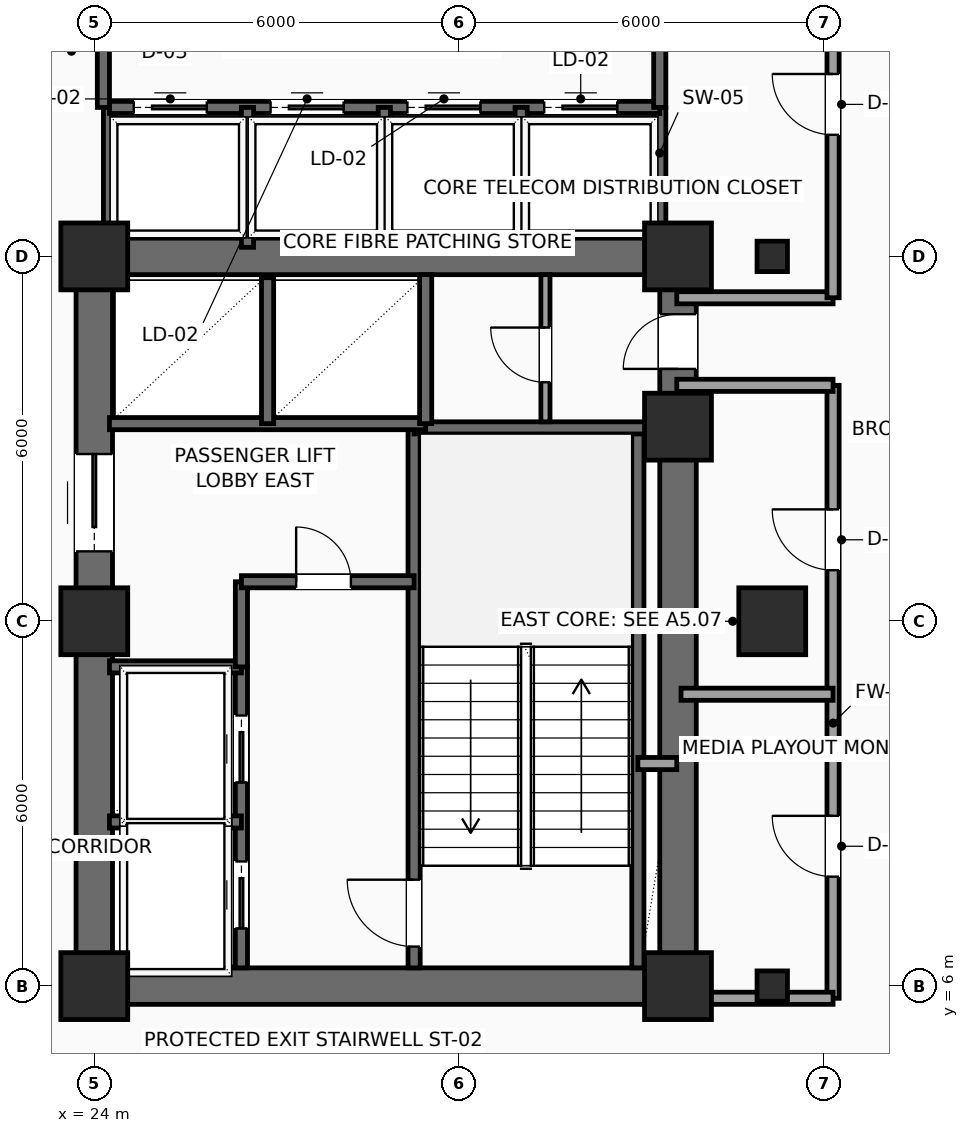
"""IFC4 building model, lengths in metres.
Left out: names, types, materials, properties, quantities, classifications, styles, units other than length and angle.
Written with IfcOpenShell. Run it as: python <this file> out.ifc"""

import sys

from ifc_helpers import new_model, si_unit, direction, frame, frame_2d, origin, origin_2d, place, context, subcontext, project, spatial, rectangle, hollow_rectangle, extrude, element, fill, save


model = new_model("IFC4")
c1 = context("Model", 3, precision=1e-05, world=origin(), true_north=direction((0.0, 1.0)))
c2 = subcontext(c1, "Body", "Model", "MODEL_VIEW")
j1 = project(units=[si_unit("LENGTHUNIT", "METRE"), si_unit("PLANEANGLEUNIT", "RADIAN")], contexts=[c1])
p1 = place(None, origin())
s1 = spatial("IfcSite", under=j1, at=p1, CompositionType="ELEMENT")
p2 = place(p1, origin())
s2 = spatial("IfcBuilding", under=s1, at=p2, CompositionType="ELEMENT")
p3 = place(p2, frame((0.0, 0.0, 123.15)))
s3 = spatial("IfcBuildingStorey", under=s2, at=p3, CompositionType="ELEMENT", Elevation=123.15)
for number, where, z_axis, x_axis in (
    (1, (24.0, 6.0, 0.0), (0.0, 0.0, 1.0), (1.0, 0.0, 0.0)),
    (2, (24.0, 12.0, 0.0), (0.0, 0.0, 1.0), (1.0, 0.0, 0.0)),
    (3, (24.0, 18.0, 0.0), (0.0, 0.0, 1.0), (1.0, 0.0, 0.0)),
    (4, (33.6, 6.0, 0.0), (0.0, 0.0, 1.0), (1.0, 0.0, 0.0)),
    (5, (33.6, 15.2, 0.0), (0.0, 0.0, 1.0), (1.0, 0.0, 0.0)),
    (6, (33.6, 18.0, 0.0), (0.0, 0.0, 1.0), (1.0, 0.0, 0.0)),
):
    element("IfcColumn", number, at=place(p3, frame(where, z_axis=z_axis, x_axis=x_axis)), inside=s3, PredefinedType="COLUMN", context=c2, shape_type="SweptSolid", body=[
        extrude(rectangle(XDim=1.1, YDim=1.1, at=origin_2d()), origin(), (0.0, 0.0, 1.0), 3.75),
    ])
p4 = place(p3, frame((35.15, 6.0, 0.0), z_axis=(0.0, 0.0, 1.0), x_axis=(1.0, 0.0, 0.0)))
e7 = element("IfcColumn", 7, at=p4, inside=s3, PredefinedType="COLUMN", context=c2, shape_type="SweptSolid", body=[
    extrude(hollow_rectangle(XDim=0.5, YDim=0.5, WallThickness=0.025, InnerFilletRadius=0.025, OuterFilletRadius=0.04, at=origin_2d()), origin(), (0.0, 0.0, 1.0), 3.75),
])
p5 = place(p3, frame((35.15, 12.0, 0.0), z_axis=(0.0, 0.0, 1.0), x_axis=(1.0, 0.0, 0.0)))
e8 = element("IfcColumn", 8, at=p5, inside=s3, PredefinedType="COLUMN", context=c2, shape_type="SweptSolid", body=[
    extrude(rectangle(XDim=1.1, YDim=1.1, at=origin_2d()), origin(), (0.0, 0.0, 1.0), 3.75),
])
p6 = place(p3, frame((35.15, 18.0, 0.0), z_axis=(0.0, 0.0, 1.0), x_axis=(1.0, 0.0, 0.0)))
e9 = element("IfcColumn", 9, at=p6, inside=s3, PredefinedType="COLUMN", context=c2, shape_type="SweptSolid", body=[
    extrude(hollow_rectangle(XDim=0.5, YDim=0.5, WallThickness=0.025, InnerFilletRadius=0.025, OuterFilletRadius=0.04, at=origin_2d()), origin(), (0.0, 0.0, 1.0), 3.75),
])
for number, where, z_axis, x_axis in (
    (10, (24.0, 6.0, 0.0), (0.0, 0.0, 1.0), (1.0, 0.0, 0.0)),
    (11, (24.0, 18.0, 0.0), (0.0, 0.0, 1.0), (1.0, 0.0, 0.0)),
):
    element("IfcWall", number, at=place(p3, frame(where, z_axis=z_axis, x_axis=x_axis)), inside=s3, PredefinedType="SHEAR", context=c2, shape_type="SweptSolid", body=[
        extrude(rectangle(XDim=9.6, YDim=0.6, at=frame_2d((4.8, 0.0))), origin(), (0.0, 0.0, 1.0), 3.525),
    ])
p7 = place(p3, frame((24.0, 6.0, 0.0), z_axis=(0.0, 0.0, 1.0), x_axis=(0.0, 1.0, 0.0)))
e12 = element("IfcWall", 12, at=p7, inside=s3, PredefinedType="SHEAR", context=c2, shape_type="SweptSolid", body=[
    extrude(rectangle(XDim=12.0, YDim=0.6, at=frame_2d((6.0, 0.0))), origin(), (0.0, 0.0, 1.0), 3.525),
])
p8 = place(p7, frame((7.15, 0.0, 0.0)))
e13 = element("IfcOpeningElement", 13, at=p8, cuts=e12, PredefinedType="OPENING", context=c2, shape_type="SweptSolid", body=[
    extrude(rectangle(XDim=1.6, YDim=2.3, at=frame_2d((0.8, 1.15))), frame((0.0, 0.31, 0.0), z_axis=(0.0, -1.0, 0.0), x_axis=(1.0, 0.0, 0.0)), (0.0, 0.0, 1.0), 0.62),
])
p9 = place(p3, frame((33.6, 6.0, 0.0), z_axis=(0.0, 0.0, 1.0), x_axis=(0.0, 1.0, 0.0)))
e14 = element("IfcWall", 14, at=p9, inside=s3, PredefinedType="SHEAR", context=c2, shape_type="SweptSolid", body=[
    extrude(rectangle(XDim=12.0, YDim=0.6, at=frame_2d((6.0, 0.0))), origin(), (0.0, 0.0, 1.0), 3.525),
])
p10 = place(p9, frame((10.15, 0.0, 0.0)))
e15 = element("IfcOpeningElement", 15, at=p10, cuts=e14, PredefinedType="OPENING", context=c2, shape_type="SweptSolid", body=[
    extrude(rectangle(XDim=0.9, YDim=2.15, at=frame_2d((0.45, 1.075))), frame((0.0, 0.31, 0.0), z_axis=(0.0, -1.0, 0.0), x_axis=(1.0, 0.0, 0.0)), (0.0, 0.0, 1.0), 0.62),
])
p11 = place(p3, frame((29.26, 6.3, 0.0), z_axis=(0.0, 0.0, 1.0), x_axis=(0.0, 1.0, 0.0)))
e16 = element("IfcWall", 16, at=p11, inside=s3, PredefinedType="SHEAR", context=c2, shape_type="SweptSolid", body=[
    extrude(rectangle(XDim=8.88, YDim=0.2, at=frame_2d((4.44, 0.0))), origin(), (0.0, 0.0, 1.0), 3.525),
])
p12 = place(p11, frame((0.35, 0.0, 0.0)))
e17 = element("IfcOpeningElement", 17, at=p12, cuts=e16, PredefinedType="OPENING", context=c2, shape_type="SweptSolid", body=[
    extrude(rectangle(XDim=1.1, YDim=2.2, at=frame_2d((0.55, 1.1))), frame((0.0, 0.11, 0.0), z_axis=(0.0, -1.0, 0.0), x_axis=(1.0, 0.0, 0.0)), (0.0, 0.0, 1.0), 0.22),
])
p13 = place(p3, frame((32.94, 6.3, 0.0), z_axis=(0.0, 0.0, 1.0), x_axis=(0.0, 1.0, 0.0)))
e18 = element("IfcWall", 18, at=p13, inside=s3, PredefinedType="SHEAR", context=c2, shape_type="SweptSolid", body=[
    extrude(rectangle(XDim=8.88, YDim=0.2, at=frame_2d((4.44, 0.0))), origin(), (0.0, 0.0, 1.0), 3.525),
])
p14 = place(p3, frame((29.26, 15.18, 0.0), z_axis=(0.0, 0.0, 1.0), x_axis=(1.0, 0.0, 0.0)))
e19 = element("IfcWall", 19, at=p14, inside=s3, PredefinedType="SHEAR", context=c2, shape_type="SweptSolid", body=[
    extrude(rectangle(XDim=4.04, YDim=0.2, at=frame_2d((2.02, 0.0))), origin(), (0.0, 0.0, 1.0), 3.525),
])
p15 = place(p3, frame((26.42, 6.3, 0.0), z_axis=(0.0, 0.0, 1.0), x_axis=(0.0, 1.0, 0.0)))
e20 = element("IfcWall", 20, at=p15, inside=s3, PredefinedType="SHEAR", context=c2, shape_type="SweptSolid", body=[
    extrude(rectangle(XDim=4.95, YDim=0.2, at=frame_2d((2.475, 0.0))), origin(), (0.0, 0.0, 1.0), 3.525),
])
p16 = place(p15, frame((0.65, 0.0, 0.0)))
e21 = element("IfcOpeningElement", 21, at=p16, cuts=e20, PredefinedType="OPENING", context=c2, shape_type="SweptSolid", body=[
    extrude(rectangle(XDim=1.1, YDim=2.2, at=frame_2d((0.55, 1.1))), frame((0.0, 0.11, 0.0), z_axis=(0.0, -1.0, 0.0), x_axis=(1.0, 0.0, 0.0)), (0.0, 0.0, 1.0), 0.22),
])
p17 = place(p15, frame((3.05, 0.0, 0.0)))
e22 = element("IfcOpeningElement", 22, at=p17, cuts=e20, PredefinedType="OPENING", context=c2, shape_type="SweptSolid", body=[
    extrude(rectangle(XDim=1.1, YDim=2.2, at=frame_2d((0.55, 1.1))), frame((0.0, 0.11, 0.0), z_axis=(0.0, -1.0, 0.0), x_axis=(1.0, 0.0, 0.0)), (0.0, 0.0, 1.0), 0.22),
])
for number, where, z_axis, x_axis in (
    (23, (24.25, 8.7, 0.0), (0.0, 0.0, 1.0), (1.0, 0.0, 0.0)),
    (24, (24.25, 11.25, 0.0), (0.0, 0.0, 1.0), (1.0, 0.0, 0.0)),
):
    element("IfcWall", number, at=place(p3, frame(where, z_axis=z_axis, x_axis=x_axis)), inside=s3, PredefinedType="SHEAR", context=c2, shape_type="SweptSolid", body=[
        extrude(rectangle(XDim=2.17, YDim=0.2, at=frame_2d((1.085, 0.0))), origin(), (0.0, 0.0, 1.0), 3.525),
    ])
p18 = place(p3, frame((26.42, 11.25, 0.0), z_axis=(0.0, 0.0, 1.0), x_axis=(0.0, 1.0, 0.0)))
e25 = element("IfcWall", 25, at=p18, inside=s3, PredefinedType="SHEAR", context=c2, shape_type="SweptSolid", body=[
    extrude(rectangle(XDim=1.4, YDim=0.2, at=frame_2d((0.7, 0.0))), origin(), (0.0, 0.0, 1.0), 3.525),
])
p19 = place(p3, frame((26.42, 12.65, 0.0), z_axis=(0.0, 0.0, 1.0), x_axis=(1.0, 0.0, 0.0)))
e26 = element("IfcWall", 26, at=p19, inside=s3, PredefinedType="SHEAR", context=c2, shape_type="SweptSolid", body=[
    extrude(rectangle(XDim=2.84, YDim=0.2, at=frame_2d((1.42, 0.0))), origin(), (0.0, 0.0, 1.0), 3.525),
])
p20 = place(p19, frame((0.9, 0.0, 0.0)))
e27 = element("IfcOpeningElement", 27, at=p20, cuts=e26, PredefinedType="OPENING", context=c2, shape_type="SweptSolid", body=[
    extrude(rectangle(XDim=0.9, YDim=2.15, at=frame_2d((0.45, 1.075))), frame((0.0, 0.11, 0.0), z_axis=(0.0, -1.0, 0.0), x_axis=(1.0, 0.0, 0.0)), (0.0, 0.0, 1.0), 0.22),
])
p21 = place(p3, frame((32.94, 9.66, 0.0), z_axis=(0.0, 0.0, 1.0), x_axis=(1.0, 0.0, 0.0)))
e28 = element("IfcWall", 28, at=p21, inside=s3, PredefinedType="SOLIDWALL", context=c2, shape_type="SweptSolid", body=[
    extrude(rectangle(XDim=0.64, YDim=0.2, at=frame_2d((0.32, 0.0))), origin(), (0.0, 0.0, 1.0), 3.525),
])
p22 = place(p3, frame((24.25, 15.25, 0.0), z_axis=(0.0, 0.0, 1.0), x_axis=(1.0, 0.0, 0.0)))
e29 = element("IfcWall", 29, at=p22, inside=s3, PredefinedType="SHEAR", context=c2, shape_type="SweptSolid", body=[
    extrude(rectangle(XDim=5.2, YDim=0.2, at=frame_2d((2.6, 0.0))), origin(), (0.0, 0.0, 1.0), 3.525),
])
p23 = place(p3, frame((26.85, 15.25, 0.0), z_axis=(0.0, 0.0, 1.0), x_axis=(0.0, 1.0, 0.0)))
e30 = element("IfcWall", 30, at=p23, inside=s3, PredefinedType="SHEAR", context=c2, shape_type="SweptSolid", body=[
    extrude(rectangle(XDim=2.4, YDim=0.2, at=frame_2d((1.2, 0.0))), origin(), (0.0, 0.0, 1.0), 3.525),
])
p24 = place(p3, frame((29.45, 15.25, 0.0), z_axis=(0.0, 0.0, 1.0), x_axis=(0.0, 1.0, 0.0)))
e31 = element("IfcWall", 31, at=p24, inside=s3, PredefinedType="SHEAR", context=c2, shape_type="SweptSolid", body=[
    extrude(rectangle(XDim=2.45, YDim=0.2, at=frame_2d((1.225, 0.0))), origin(), (0.0, 0.0, 1.0), 3.525),
])
p25 = place(p3, frame((31.42, 15.28, 0.0), z_axis=(0.0, 0.0, 1.0), x_axis=(0.0, 1.0, 0.0)))
e32 = element("IfcWall", 32, at=p25, inside=s3, PredefinedType="PARTITIONING", context=c2, shape_type="SweptSolid", body=[
    extrude(rectangle(XDim=2.42, YDim=0.15, at=frame_2d((1.21, 0.0))), origin(), (0.0, 0.0, 1.0), 3.525),
])
p26 = place(p25, frame((0.65, 0.0, 0.0)))
e33 = element("IfcOpeningElement", 33, at=p26, cuts=e32, PredefinedType="OPENING", context=c2, shape_type="SweptSolid", body=[
    extrude(rectangle(XDim=0.9, YDim=2.15, at=frame_2d((0.45, 1.075))), frame((0.0, 0.085, 0.0), z_axis=(0.0, -1.0, 0.0), x_axis=(1.0, 0.0, 0.0)), (0.0, 0.0, 1.0), 0.17),
])
for number, where, z_axis, x_axis in (
    (34, (33.3, 18.1, 0.0), (0.0, 0.0, 1.0), (0.0, 1.0, 0.0)),
    (35, (24.25, 18.1, 0.0), (0.0, 0.0, 1.0), (0.0, 1.0, 0.0)),
):
    element("IfcWall", number, at=place(p3, frame(where, z_axis=z_axis, x_axis=x_axis)), inside=s3, PredefinedType="SHEAR", context=c2, shape_type="SweptSolid", body=[
        extrude(rectangle(XDim=2.35, YDim=0.2, at=frame_2d((1.175, 0.0))), origin(), (0.0, 0.0, 1.0), 3.525),
    ])
p27 = place(p3, frame((24.25, 20.45, 0.0), z_axis=(0.0, 0.0, 1.0), x_axis=(1.0, 0.0, 0.0)))
e36 = element("IfcWall", 36, at=p27, inside=s3, PredefinedType="SHEAR", context=c2, shape_type="SweptSolid", body=[
    extrude(rectangle(XDim=9.05, YDim=0.2, at=frame_2d((4.525, 0.0))), origin(), (0.0, 0.0, 1.0), 3.525),
])
p28 = place(p27, frame((0.4, 0.0, 0.0)))
e37 = element("IfcOpeningElement", 37, at=p28, cuts=e36, PredefinedType="OPENING", context=c2, shape_type="SweptSolid", body=[
    extrude(rectangle(XDim=1.2, YDim=2.2, at=frame_2d((0.6, 1.1))), frame((0.0, 0.11, 0.0), z_axis=(0.0, -1.0, 0.0), x_axis=(1.0, 0.0, 0.0)), (0.0, 0.0, 1.0), 0.22),
])
p29 = place(p27, frame((2.65, 0.0, 0.0)))
e38 = element("IfcOpeningElement", 38, at=p29, cuts=e36, PredefinedType="OPENING", context=c2, shape_type="SweptSolid", body=[
    extrude(rectangle(XDim=1.2, YDim=2.2, at=frame_2d((0.6, 1.1))), frame((0.0, 0.11, 0.0), z_axis=(0.0, -1.0, 0.0), x_axis=(1.0, 0.0, 0.0)), (0.0, 0.0, 1.0), 0.22),
])
p30 = place(p27, frame((4.9, 0.0, 0.0)))
e39 = element("IfcOpeningElement", 39, at=p30, cuts=e36, PredefinedType="OPENING", context=c2, shape_type="SweptSolid", body=[
    extrude(rectangle(XDim=1.2, YDim=2.2, at=frame_2d((0.6, 1.1))), frame((0.0, 0.11, 0.0), z_axis=(0.0, -1.0, 0.0), x_axis=(1.0, 0.0, 0.0)), (0.0, 0.0, 1.0), 0.22),
])
p31 = place(p27, frame((7.15, 0.0, 0.0)))
e40 = element("IfcOpeningElement", 40, at=p31, cuts=e36, PredefinedType="OPENING", context=c2, shape_type="SweptSolid", body=[
    extrude(rectangle(XDim=1.2, YDim=2.2, at=frame_2d((0.6, 1.1))), frame((0.0, 0.11, 0.0), z_axis=(0.0, -1.0, 0.0), x_axis=(1.0, 0.0, 0.0)), (0.0, 0.0, 1.0), 0.22),
])
for number, where, z_axis, x_axis in (
    (41, (26.52, 18.15, 0.0), (0.0, 0.0, 1.0), (0.0, 1.0, 0.0)),
    (42, (28.77, 18.15, 0.0), (0.0, 0.0, 1.0), (0.0, 1.0, 0.0)),
    (43, (31.02, 18.15, 0.0), (0.0, 0.0, 1.0), (0.0, 1.0, 0.0)),
):
    element("IfcWall", number, at=place(p3, frame(where, z_axis=z_axis, x_axis=x_axis)), inside=s3, PredefinedType="SHEAR", context=c2, shape_type="SweptSolid", body=[
        extrude(rectangle(XDim=2.3, YDim=0.2, at=frame_2d((1.15, 0.0))), origin(), (0.0, 0.0, 1.0), 3.525),
    ])
p32 = place(p3, frame((33.3, 20.45, 0.0), z_axis=(0.0, 0.0, 1.0), x_axis=(0.0, 1.0, 0.0)))
e44 = element("IfcWall", 44, at=p32, inside=s3, PredefinedType="SHEAR", context=c2, shape_type="SweptSolid", body=[
    extrude(rectangle(XDim=3.05, YDim=0.2, at=frame_2d((1.525, 0.0))), origin(), (0.0, 0.0, 1.0), 3.525),
])
p33 = place(p3, frame((24.15, 20.45, 0.0), z_axis=(0.0, 0.0, 1.0), x_axis=(0.0, 1.0, 0.0)))
e45 = element("IfcWall", 45, at=p33, inside=s3, PredefinedType="SHEAR", context=c2, shape_type="SweptSolid", body=[
    extrude(rectangle(XDim=3.05, YDim=0.2, at=frame_2d((1.525, 0.0))), origin(), (0.0, 0.0, 1.0), 3.525),
])
p34 = place(p33, frame((0.95, 0.0, 0.0)))
e46 = element("IfcOpeningElement", 46, at=p34, cuts=e45, PredefinedType="OPENING", context=c2, shape_type="SweptSolid", body=[
    extrude(rectangle(XDim=0.9, YDim=2.15, at=frame_2d((0.45, 1.075))), frame((0.0, 0.11, 0.0), z_axis=(0.0, -1.0, 0.0), x_axis=(1.0, 0.0, 0.0)), (0.0, 0.0, 1.0), 0.22),
])
p35 = place(p3, frame((36.15, 5.8, 0.0), z_axis=(0.0, 0.0, 1.0), x_axis=(0.0, 1.0, 0.0)))
e47 = element("IfcWall", 47, at=p35, inside=s3, PredefinedType="SOLIDWALL", context=c2, shape_type="SweptSolid", body=[
    extrude(rectangle(XDim=10.08, YDim=0.2, at=frame_2d((5.04, 0.0))), origin(), (0.0, 0.0, 1.0), 3.525),
])
p36 = place(p35, frame((2.0, 0.0, 0.0)))
e48 = element("IfcOpeningElement", 48, at=p36, cuts=e47, PredefinedType="OPENING", context=c2, shape_type="SweptSolid", body=[
    extrude(rectangle(XDim=1.0, YDim=2.2, at=frame_2d((0.5, 1.1))), frame((0.0, 0.11, 0.0), z_axis=(0.0, -1.0, 0.0), x_axis=(1.0, 0.0, 0.0)), (0.0, 0.0, 1.0), 0.22),
])
p37 = place(p35, frame((7.04, 0.0, 0.0)))
e49 = element("IfcOpeningElement", 49, at=p37, cuts=e47, PredefinedType="OPENING", context=c2, shape_type="SweptSolid", body=[
    extrude(rectangle(XDim=1.0, YDim=2.2, at=frame_2d((0.5, 1.1))), frame((0.0, 0.11, 0.0), z_axis=(0.0, -1.0, 0.0), x_axis=(1.0, 0.0, 0.0)), (0.0, 0.0, 1.0), 0.22),
])
for number, where, z_axis, x_axis in (
    (50, (36.15, 15.88, 0.0), (0.0, 0.0, 1.0), (-1.0, 0.0, 0.0)),
    (51, (33.58, 17.32, 0.0), (0.0, 0.0, 1.0), (1.0, 0.0, 0.0)),
):
    element("IfcWall", number, at=place(p3, frame(where, z_axis=z_axis, x_axis=x_axis)), inside=s3, PredefinedType="SOLIDWALL", context=c2, shape_type="SweptSolid", body=[
        extrude(rectangle(XDim=2.57, YDim=0.2, at=frame_2d((1.285, 0.0))), origin(), (0.0, 0.0, 1.0), 3.525),
    ])
p38 = place(p3, frame((36.15, 17.32, 0.0), z_axis=(0.0, 0.0, 1.0), x_axis=(0.0, 1.0, 0.0)))
e52 = element("IfcWall", 52, at=p38, inside=s3, PredefinedType="SOLIDWALL", context=c2, shape_type="SweptSolid", body=[
    extrude(rectangle(XDim=6.38, YDim=0.2, at=frame_2d((3.19, 0.0))), origin(), (0.0, 0.0, 1.0), 3.525),
])
p39 = place(p38, frame((2.68, 0.0, 0.0)))
e53 = element("IfcOpeningElement", 53, at=p39, cuts=e52, PredefinedType="OPENING", context=c2, shape_type="SweptSolid", body=[
    extrude(rectangle(XDim=1.0, YDim=2.2, at=frame_2d((0.5, 1.1))), frame((0.0, 0.11, 0.0), z_axis=(0.0, -1.0, 0.0), x_axis=(1.0, 0.0, 0.0)), (0.0, 0.0, 1.0), 0.22),
])
p40 = place(p3, frame((33.65, 5.8, 0.0), z_axis=(0.0, 0.0, 1.0), x_axis=(1.0, 0.0, 0.0)))
e54 = element("IfcWall", 54, at=p40, inside=s3, PredefinedType="PARTITIONING", context=c2, shape_type="SweptSolid", body=[
    extrude(rectangle(XDim=2.5, YDim=0.2, at=frame_2d((1.25, 0.0))), origin(), (0.0, 0.0, 1.0), 3.017),
])
p41 = place(p3, frame((33.65, 10.8, 0.0), z_axis=(0.0, 0.0, 1.0), x_axis=(1.0, 0.0, 0.0)))
e55 = element("IfcWall", 55, at=p41, inside=s3, PredefinedType="PARTITIONING", context=c2, shape_type="SweptSolid", body=[
    extrude(rectangle(XDim=2.5, YDim=0.2, at=frame_2d((1.25, 0.0))), origin(), (0.0, 0.0, 1.0), 3.525),
])
p42 = place(p8, origin())
e56 = element("IfcDoor", 56, at=p42, inside=s3, OperationType="DOUBLE_DOOR_SLIDING", PredefinedType="DOOR", context=c2, shape_type="SweptSolid", body=[
    extrude(rectangle(XDim=1.6, YDim=2.3, at=frame_2d((0.8, 1.15))), frame((0.0, 0.025, 0.0), z_axis=(0.0, -1.0, 0.0), x_axis=(1.0, 0.0, 0.0)), (0.0, 0.0, 1.0), 0.05),
])
fill(e13, e56)
p43 = place(p10, origin())
e57 = element("IfcDoor", 57, at=p43, inside=s3, OperationType="SINGLE_SWING_LEFT", PredefinedType="DOOR", context=c2, shape_type="SweptSolid", body=[
    extrude(rectangle(XDim=0.9, YDim=2.15, at=frame_2d((0.45, 1.075))), frame((0.0, 0.025, 0.0), z_axis=(0.0, -1.0, 0.0), x_axis=(1.0, 0.0, 0.0)), (0.0, 0.0, 1.0), 0.05),
])
fill(e15, e57)
p44 = place(p12, origin())
e58 = element("IfcDoor", 58, at=p44, inside=s3, OperationType="SINGLE_SWING_RIGHT", PredefinedType="DOOR", context=c2, shape_type="SweptSolid", body=[
    extrude(rectangle(XDim=1.1, YDim=2.2, at=frame_2d((0.55, 1.1))), frame((0.0, 0.025, 0.0), z_axis=(0.0, -1.0, 0.0), x_axis=(1.0, 0.0, 0.0)), (0.0, 0.0, 1.0), 0.05),
])
fill(e17, e58)
p45 = place(p16, origin())
e59 = element("IfcDoor", 59, at=p45, inside=s3, OperationType="SLIDING_TO_LEFT", PredefinedType="DOOR", context=c2, shape_type="SweptSolid", body=[
    extrude(rectangle(XDim=1.1, YDim=2.2, at=frame_2d((0.55, 1.1))), frame((0.0, 0.025, 0.0), z_axis=(0.0, -1.0, 0.0), x_axis=(1.0, 0.0, 0.0)), (0.0, 0.0, 1.0), 0.05),
])
fill(e21, e59)
p46 = place(p17, origin())
e60 = element("IfcDoor", 60, at=p46, inside=s3, OperationType="SLIDING_TO_LEFT", PredefinedType="DOOR", context=c2, shape_type="SweptSolid", body=[
    extrude(rectangle(XDim=1.1, YDim=2.2, at=frame_2d((0.55, 1.1))), frame((0.0, 0.025, 0.0), z_axis=(0.0, -1.0, 0.0), x_axis=(1.0, 0.0, 0.0)), (0.0, 0.0, 1.0), 0.05),
])
fill(e22, e60)
p47 = place(p20, origin())
e61 = element("IfcDoor", 61, at=p47, inside=s3, OperationType="SINGLE_SWING_LEFT", PredefinedType="DOOR", context=c2, shape_type="SweptSolid", body=[
    extrude(rectangle(XDim=0.9, YDim=2.15, at=frame_2d((0.45, 1.075))), frame((0.0, 0.025, 0.0), z_axis=(0.0, -1.0, 0.0), x_axis=(1.0, 0.0, 0.0)), (0.0, 0.0, 1.0), 0.05),
])
fill(e27, e61)
p48 = place(p26, origin())
e62 = element("IfcDoor", 62, at=p48, inside=s3, OperationType="SINGLE_SWING_RIGHT", PredefinedType="DOOR", context=c2, shape_type="SweptSolid", body=[
    extrude(rectangle(XDim=0.9, YDim=2.15, at=frame_2d((0.45, 1.075))), frame((0.0, 0.025, 0.0), z_axis=(0.0, -1.0, 0.0), x_axis=(1.0, 0.0, 0.0)), (0.0, 0.0, 1.0), 0.05),
])
fill(e33, e62)
p49 = place(p28, origin())
e63 = element("IfcDoor", 63, at=p49, inside=s3, OperationType="SLIDING_TO_RIGHT", PredefinedType="DOOR", context=c2, shape_type="SweptSolid", body=[
    extrude(rectangle(XDim=1.2, YDim=2.2, at=frame_2d((0.6, 1.1))), frame((0.0, 0.025, 0.0), z_axis=(0.0, -1.0, 0.0), x_axis=(1.0, 0.0, 0.0)), (0.0, 0.0, 1.0), 0.05),
])
fill(e37, e63)
p50 = place(p29, origin())
e64 = element("IfcDoor", 64, at=p50, inside=s3, OperationType="SLIDING_TO_RIGHT", PredefinedType="DOOR", context=c2, shape_type="SweptSolid", body=[
    extrude(rectangle(XDim=1.2, YDim=2.2, at=frame_2d((0.6, 1.1))), frame((0.0, 0.025, 0.0), z_axis=(0.0, -1.0, 0.0), x_axis=(1.0, 0.0, 0.0)), (0.0, 0.0, 1.0), 0.05),
])
fill(e38, e64)
p51 = place(p30, origin())
e65 = element("IfcDoor", 65, at=p51, inside=s3, OperationType="SLIDING_TO_RIGHT", PredefinedType="DOOR", context=c2, shape_type="SweptSolid", body=[
    extrude(rectangle(XDim=1.2, YDim=2.2, at=frame_2d((0.6, 1.1))), frame((0.0, 0.025, 0.0), z_axis=(0.0, -1.0, 0.0), x_axis=(1.0, 0.0, 0.0)), (0.0, 0.0, 1.0), 0.05),
])
fill(e39, e65)
p52 = place(p31, origin())
e66 = element("IfcDoor", 66, at=p52, inside=s3, OperationType="SLIDING_TO_RIGHT", PredefinedType="DOOR", context=c2, shape_type="SweptSolid", body=[
    extrude(rectangle(XDim=1.2, YDim=2.2, at=frame_2d((0.6, 1.1))), frame((0.0, 0.025, 0.0), z_axis=(0.0, -1.0, 0.0), x_axis=(1.0, 0.0, 0.0)), (0.0, 0.0, 1.0), 0.05),
])
fill(e40, e66)
p53 = place(p36, origin())
e67 = element("IfcDoor", 67, at=p53, inside=s3, OperationType="SINGLE_SWING_RIGHT", PredefinedType="DOOR", context=c2, shape_type="SweptSolid", body=[
    extrude(rectangle(XDim=1.0, YDim=2.2, at=frame_2d((0.5, 1.1))), frame((0.0, 0.025, 0.0), z_axis=(0.0, -1.0, 0.0), x_axis=(1.0, 0.0, 0.0)), (0.0, 0.0, 1.0), 0.05),
])
fill(e48, e67)
p54 = place(p37, origin())
e68 = element("IfcDoor", 68, at=p54, inside=s3, OperationType="SINGLE_SWING_RIGHT", PredefinedType="DOOR", context=c2, shape_type="SweptSolid", body=[
    extrude(rectangle(XDim=1.0, YDim=2.2, at=frame_2d((0.5, 1.1))), frame((0.0, 0.025, 0.0), z_axis=(0.0, -1.0, 0.0), x_axis=(1.0, 0.0, 0.0)), (0.0, 0.0, 1.0), 0.05),
])
fill(e49, e68)
p55 = place(p39, origin())
e69 = element("IfcDoor", 69, at=p55, inside=s3, OperationType="SINGLE_SWING_RIGHT", PredefinedType="DOOR", context=c2, shape_type="SweptSolid", body=[
    extrude(rectangle(XDim=1.0, YDim=2.2, at=frame_2d((0.5, 1.1))), frame((0.0, 0.025, 0.0), z_axis=(0.0, -1.0, 0.0), x_axis=(1.0, 0.0, 0.0)), (0.0, 0.0, 1.0), 0.05),
])
fill(e53, e69)
save(model, sys.argv[1])
